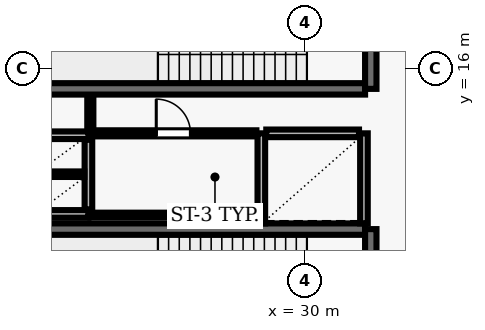
"""IFC4 building model, lengths in metres.
Left out: names, types, materials, properties, quantities, classifications, styles, units other than length and angle.
Written with IfcOpenShell. Run it as: python <this file> out.ifc"""

import sys

from ifc_helpers import new_model, si_unit, direction, frame, frame_2d, origin, place, context, subcontext, project, spatial, rectangle, extrude, element, fill, save


model = new_model("IFC4")
c1 = context("Model", 3, precision=1e-05, world=origin(), true_north=direction((0.0, 1.0)))
c2 = subcontext(c1, "Body", "Model", "MODEL_VIEW")
j1 = project(units=[si_unit("LENGTHUNIT", "METRE"), si_unit("PLANEANGLEUNIT", "RADIAN")], contexts=[c1])
p1 = place(None, origin())
s1 = spatial("IfcSite", under=j1, at=p1, CompositionType="ELEMENT")
p2 = place(p1, origin())
s2 = spatial("IfcBuilding", under=s1, at=p2, CompositionType="ELEMENT")
p3 = place(p2, frame((0.0, 0.0, 15.6)))
s3 = spatial("IfcBuildingStorey", under=s2, at=p3, CompositionType="ELEMENT", Elevation=15.6)
p4 = place(p3, frame((23.22, 15.47, 0.0), z_axis=(0.0, 0.0, 1.0), x_axis=(1.0, 0.0, 0.0)))
e1 = element("IfcWall", 1, at=p4, inside=s3, PredefinedType="SHEAR", context=c2, shape_type="SweptSolid", body=[
    extrude(rectangle(XDim=8.36, YDim=0.3, at=frame_2d((4.18, 0.0))), origin(), (0.0, 0.0, 1.0), 4.92),
])
p5 = place(p3, frame((31.73, 15.47, 0.0), z_axis=(0.0, 0.0, 1.0), x_axis=(0.0, 1.0, 0.0)))
e2 = element("IfcWall", 2, at=p5, inside=s3, PredefinedType="SHEAR", context=c2, shape_type="SweptSolid", body=[
    extrude(rectangle(XDim=3.51, YDim=0.3, at=frame_2d((1.755, 0.0))), origin(), (0.0, 0.0, 1.0), 4.92),
])
p6 = place(p5, frame((1.18, 0.0, 0.0)))
e3 = element("IfcOpeningElement", 3, at=p6, cuts=e2, PredefinedType="OPENING", context=c2, shape_type="SweptSolid", body=[
    extrude(rectangle(XDim=1.15, YDim=2.15, at=frame_2d((0.575, 1.075))), frame((0.0, 0.16, 0.0), z_axis=(0.0, -1.0, 0.0), x_axis=(1.0, 0.0, 0.0)), (0.0, 0.0, 1.0), 0.32),
])
p7 = place(p3, frame((31.58, 11.78, 0.0), z_axis=(0.0, 0.0, 1.0), x_axis=(-1.0, 0.0, 0.0)))
e4 = element("IfcWall", 4, at=p7, inside=s3, PredefinedType="SHEAR", context=c2, shape_type="SweptSolid", body=[
    extrude(rectangle(XDim=8.36, YDim=0.3, at=frame_2d((4.18, 0.0))), origin(), (0.0, 0.0, 1.0), 4.92),
])
p8 = place(p3, frame((31.73, 8.27, 0.0), z_axis=(0.0, 0.0, 1.0), x_axis=(0.0, 1.0, 0.0)))
e5 = element("IfcWall", 5, at=p8, inside=s3, PredefinedType="SHEAR", context=c2, shape_type="SweptSolid", body=[
    extrude(rectangle(XDim=3.51, YDim=0.3, at=frame_2d((1.755, 0.0))), origin(), (0.0, 0.0, 1.0), 4.92),
])
p9 = place(p8, frame((1.18, 0.0, 0.0)))
e6 = element("IfcOpeningElement", 6, at=p9, cuts=e5, PredefinedType="OPENING", context=c2, shape_type="SweptSolid", body=[
    extrude(rectangle(XDim=1.15, YDim=2.15, at=frame_2d((0.575, 1.075))), frame((0.0, 0.16, 0.0), z_axis=(0.0, -1.0, 0.0), x_axis=(1.0, 0.0, 0.0)), (0.0, 0.0, 1.0), 0.32),
])
for number, where, z_axis, x_axis in (
    (7, (28.85, 14.3, 0.0), (0.0, 0.0, 1.0), (0.0, -1.0, 0.0)),
    (8, (31.55, 11.93, 0.0), (0.0, 0.0, 1.0), (0.0, 1.0, 0.0)),
):
    element("IfcWall", number, at=place(p3, frame(where, z_axis=z_axis, x_axis=x_axis)), inside=s3, PredefinedType="SOLIDWALL", context=c2, shape_type="SweptSolid", body=[
        extrude(rectangle(XDim=2.37, YDim=0.2, at=frame_2d((1.185, 0.0))), origin(), (0.0, 0.0, 1.0), 4.92),
    ])
p10 = place(p3, frame((31.42, 14.3, 0.0), z_axis=(0.0, 0.0, 1.0), x_axis=(-1.0, 0.0, 0.0)))
e9 = element("IfcWall", 9, at=p10, inside=s3, PredefinedType="SOLIDWALL", context=c2, shape_type="SweptSolid", body=[
    extrude(rectangle(XDim=2.44, YDim=0.2, at=frame_2d((1.22, 0.0))), origin(), (0.0, 0.0, 1.0), 4.92),
])
for number, where, z_axis, x_axis in (
    (10, (22.9, 14.25, 0.0), (0.0, 0.0, 1.0), (1.0, 0.0, 0.0)),
    (11, (22.9, 12.18, 0.0), (0.0, 0.0, 1.0), (1.0, 0.0, 0.0)),
):
    element("IfcWall", number, at=place(p3, frame(where, z_axis=z_axis, x_axis=x_axis)), inside=s3, PredefinedType="SOLIDWALL", context=c2, shape_type="SweptSolid", body=[
        extrude(rectangle(XDim=1.4, YDim=0.2, at=frame_2d((0.7, 0.0))), origin(), (0.0, 0.0, 1.0), 4.92),
    ])
p11 = place(p3, frame((24.3, 12.3, 0.0), z_axis=(0.0, 0.0, 1.0), x_axis=(0.0, 1.0, 0.0)))
e12 = element("IfcWall", 12, at=p11, inside=s3, PredefinedType="SOLIDWALL", context=c2, shape_type="SweptSolid", body=[
    extrude(rectangle(XDim=1.83, YDim=0.2, at=frame_2d((0.915, 0.0))), origin(), (0.0, 0.0, 1.0), 4.92),
])
p12 = place(p3, frame((23.01, 13.225, 0.0), z_axis=(0.0, 0.0, 1.0), x_axis=(1.0, 0.0, 0.0)))
e13 = element("IfcWall", 13, at=p12, inside=s3, PredefinedType="PARTITIONING", context=c2, shape_type="SweptSolid", body=[
    extrude(rectangle(XDim=1.18, YDim=0.145, at=frame_2d((0.59, 0.0))), origin(), (0.0, 0.0, 1.0), 4.92),
])
p13 = place(p3, frame((24.35, 12.15, 0.0), z_axis=(0.0, 0.0, 1.0), x_axis=(1.0, 0.0, 0.0)))
e14 = element("IfcWall", 14, at=p13, inside=s3, PredefinedType="PARTITIONING", context=c2, shape_type="SweptSolid", body=[
    extrude(rectangle(XDim=4.37, YDim=0.125, at=frame_2d((2.185, 0.0))), origin(), (0.0, 0.0, 1.0), 4.92),
])
p14 = place(p3, frame((24.35, 14.3, 0.0), z_axis=(0.0, 0.0, 1.0), x_axis=(1.0, 0.0, 0.0)))
e15 = element("IfcWall", 15, at=p14, inside=s3, PredefinedType="PARTITIONING", context=c2, shape_type="SweptSolid", body=[
    extrude(rectangle(XDim=4.37, YDim=0.16, at=frame_2d((2.185, 0.0))), origin(), (0.0, 0.0, 1.0), 4.92),
])
p15 = place(p14, frame((1.735, 0.0, 0.0)))
e16 = element("IfcOpeningElement", 16, at=p15, cuts=e15, PredefinedType="OPENING", context=c2, shape_type="SweptSolid", body=[
    extrude(rectangle(XDim=0.9, YDim=2.1, at=frame_2d((0.45, 1.05))), frame((0.0, 0.09, 0.0), z_axis=(0.0, -1.0, 0.0), x_axis=(1.0, 0.0, 0.0)), (0.0, 0.0, 1.0), 0.18),
])
p16 = place(p3, frame((24.35, 15.29, 0.0), z_axis=(0.0, 0.0, 1.0), x_axis=(0.0, -1.0, 0.0)))
e17 = element("IfcWall", 17, at=p16, inside=s3, PredefinedType="PARTITIONING", context=c2, shape_type="SweptSolid", body=[
    extrude(rectangle(XDim=0.915, YDim=0.16, at=frame_2d((0.458, 0.0))), origin(), (0.0, 0.0, 1.0), 4.92),
])
p17 = place(p15, origin())
e18 = element("IfcDoor", 18, at=p17, inside=s3, OperationType="SINGLE_SWING_LEFT", PredefinedType="DOOR", context=c2, shape_type="SweptSolid", body=[
    extrude(rectangle(XDim=0.9, YDim=2.1, at=frame_2d((0.45, 1.05))), frame((0.0, 0.025, 0.0), z_axis=(0.0, -1.0, 0.0), x_axis=(1.0, 0.0, 0.0)), (0.0, 0.0, 1.0), 0.05),
])
fill(e16, e18)
save(model, sys.argv[1])
